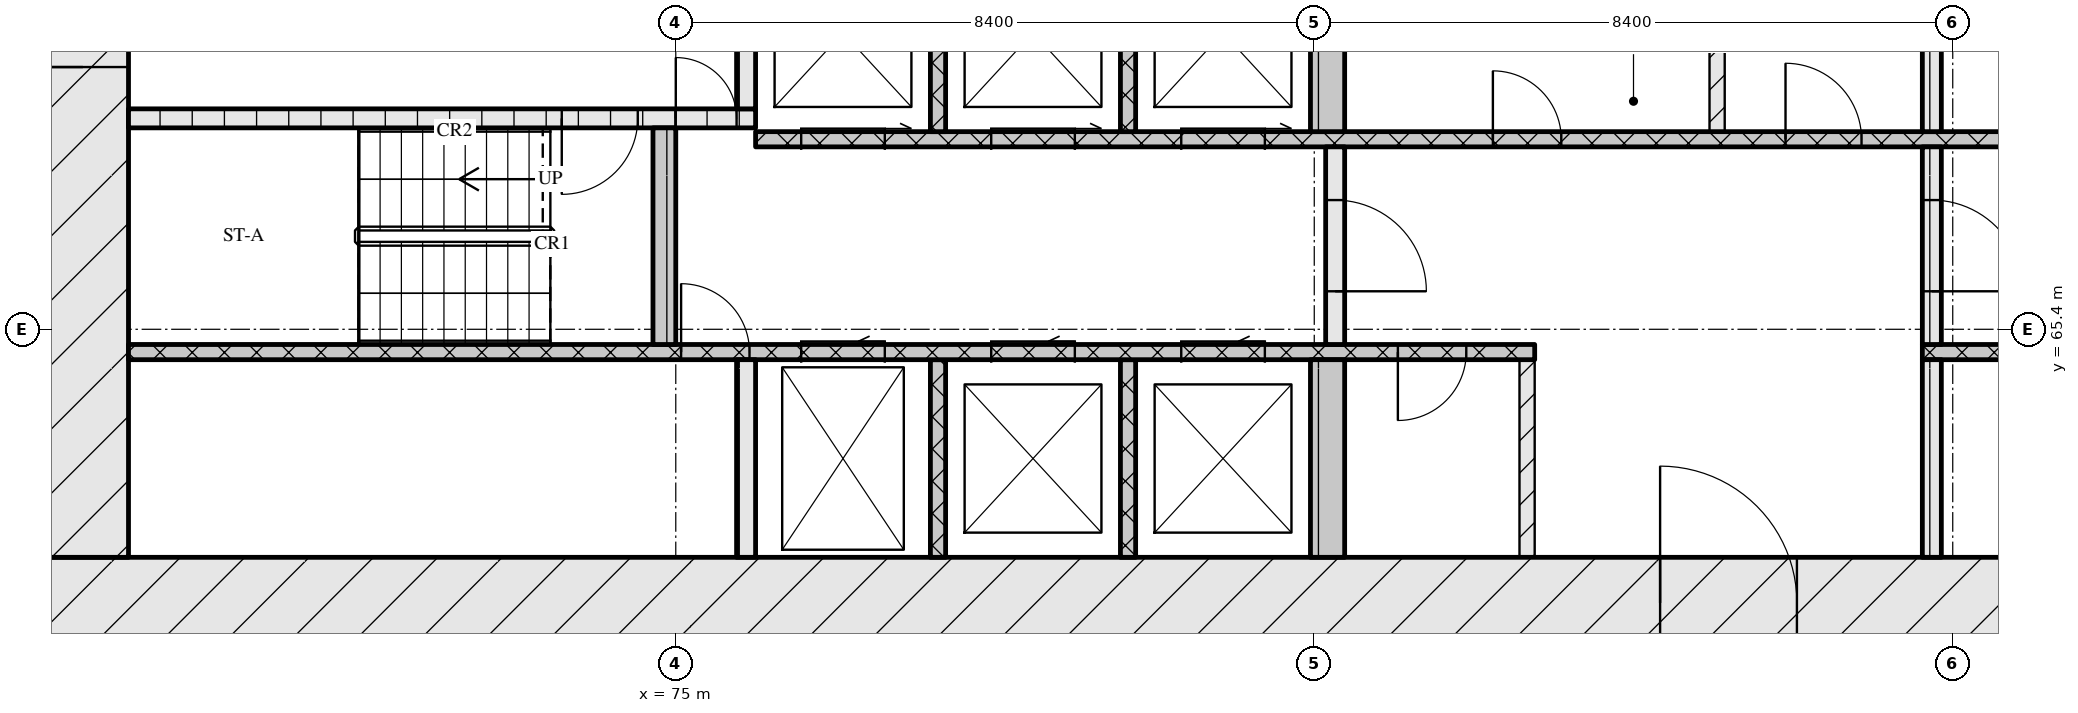
"""IFC4 building model, lengths in metres.
Left out: names, types, materials, properties, quantities, classifications, styles, units other than length and angle.
Written with IfcOpenShell. Run it as: python <this file> out.ifc"""

import sys

from ifc_helpers import new_model, si_unit, direction, frame, frame_2d, origin, place, context, subcontext, project, spatial, rectangle, extrude, element, fill, save


model = new_model("IFC4")
c1 = context("Model", 3, precision=1e-05, world=origin(), true_north=direction((0.0, 1.0)))
c2 = subcontext(c1, "Body", "Model", "MODEL_VIEW")
j1 = project(units=[si_unit("LENGTHUNIT", "METRE"), si_unit("PLANEANGLEUNIT", "RADIAN")], contexts=[c1])
p1 = place(None, origin())
s1 = spatial("IfcSite", under=j1, at=p1, CompositionType="ELEMENT")
p2 = place(p1, origin())
s2 = spatial("IfcBuilding", under=s1, at=p2, CompositionType="ELEMENT")
p3 = place(p2, frame((0.0, 0.0, 51.6)))
s3 = spatial("IfcBuildingStorey", under=s2, at=p3, CompositionType="ELEMENT", Elevation=51.6)
p4 = place(p3, frame((66.6, 61.8, 0.0), z_axis=(0.0, 0.0, 1.0), x_axis=(1.0, 0.0, 0.0)))
e1 = element("IfcWall", 1, at=p4, inside=s3, PredefinedType="SOLIDWALL", context=c2, shape_type="SweptSolid", body=[
    extrude(rectangle(XDim=42.0, YDim=1.2, at=frame_2d((21.0, 0.0))), origin(), (0.0, 0.0, 1.0), 3.32),
])
p5 = place(p4, frame((21.35, 0.0, 0.0)))
e2 = element("IfcOpeningElement", 2, at=p5, cuts=e1, PredefinedType="OPENING", context=c2, shape_type="SweptSolid", body=[
    extrude(rectangle(XDim=1.8, YDim=2.1, at=frame_2d((0.9, 1.05))), frame((0.0, 0.61, 0.0), z_axis=(0.0, -1.0, 0.0), x_axis=(1.0, 0.0, 0.0)), (0.0, 0.0, 1.0), 1.22),
])
p6 = place(p3, frame((67.2, 62.4, 0.0), z_axis=(0.0, 0.0, 1.0), x_axis=(0.0, 1.0, 0.0)))
e3 = element("IfcWall", 3, at=p6, inside=s3, PredefinedType="SOLIDWALL", context=c2, shape_type="SweptSolid", body=[
    extrude(rectangle(XDim=12.0, YDim=1.2, at=frame_2d((6.0, 0.0))), origin(), (0.0, 0.0, 1.0), 3.32),
])
p7 = place(p6, frame((6.45, 0.0, 0.0)))
e4 = element("IfcOpeningElement", 4, at=p7, cuts=e3, PredefinedType="OPENING", context=c2, shape_type="SweptSolid", body=[
    extrude(rectangle(XDim=1.2, YDim=2.1, at=frame_2d((0.6, 1.05))), frame((0.0, 0.61, 0.0), z_axis=(0.0, -1.0, 0.0), x_axis=(1.0, 0.0, 0.0)), (0.0, 0.0, 1.0), 1.22),
])
p8 = place(p3, frame((75.925, 62.4, 0.0), z_axis=(0.0, 0.0, 1.0), x_axis=(0.0, 1.0, 0.0)))
e5 = element("IfcWall", 5, at=p8, inside=s3, PredefinedType="SOLIDWALL", context=c2, shape_type="SweptSolid", body=[
    extrude(rectangle(XDim=2.6, YDim=0.25, at=frame_2d((1.3, 0.0))), origin(), (0.0, 0.0, 1.0), 3.32),
])
for number, where, z_axis, x_axis in (
    (6, (78.45, 62.4, 0.0), (0.0, 0.0, 1.0), (0.0, 1.0, 0.0)),
    (7, (80.95, 62.4, 0.0), (0.0, 0.0, 1.0), (0.0, 1.0, 0.0)),
):
    element("IfcWall", number, at=place(p3, frame(where, z_axis=z_axis, x_axis=x_axis)), inside=s3, PredefinedType="SOLIDWALL", context=c2, shape_type="SweptSolid", body=[
        extrude(rectangle(XDim=2.6, YDim=0.2, at=frame_2d((1.3, 0.0))), origin(), (0.0, 0.0, 1.0), 3.32),
    ])
p9 = place(p3, frame((83.575, 62.4, 0.0), z_axis=(0.0, 0.0, 1.0), x_axis=(0.0, 1.0, 0.0)))
e8 = element("IfcWall", 8, at=p9, inside=s3, PredefinedType="SOLIDWALL", context=c2, shape_type="SweptSolid", body=[
    extrude(rectangle(XDim=2.6, YDim=0.45, at=frame_2d((1.3, 0.0))), origin(), (0.0, 0.0, 1.0), 3.32),
])
p10 = place(p3, frame((86.2, 62.4, 0.0), z_axis=(0.0, 0.0, 1.0), x_axis=(0.0, 1.0, 0.0)))
e9 = element("IfcWall", 9, at=p10, inside=s3, PredefinedType="PARTITIONING", context=c2, shape_type="SweptSolid", body=[
    extrude(rectangle(XDim=2.6, YDim=0.2, at=frame_2d((1.3, 0.0))), origin(), (0.0, 0.0, 1.0), 3.32),
])
p11 = place(p3, frame((91.525, 62.4, 0.0), z_axis=(0.0, 0.0, 1.0), x_axis=(0.0, 1.0, 0.0)))
e10 = element("IfcWall", 10, at=p11, inside=s3, PredefinedType="SOLIDWALL", context=c2, shape_type="SweptSolid", body=[
    extrude(rectangle(XDim=2.6, YDim=0.25, at=frame_2d((1.3, 0.0))), origin(), (0.0, 0.0, 1.0), 3.32),
])
p12 = place(p3, frame((67.8, 65.1, 0.0), z_axis=(0.0, 0.0, 1.0), x_axis=(1.0, 0.0, 0.0)))
e11 = element("IfcWall", 11, at=p12, inside=s3, PredefinedType="SOLIDWALL", context=c2, shape_type="SweptSolid", body=[
    extrude(rectangle(XDim=18.5, YDim=0.2, at=frame_2d((9.25, 0.0))), origin(), (0.0, 0.0, 1.0), 3.32),
])
p13 = place(p12, frame((7.27, 0.0, 0.0)))
e12 = element("IfcOpeningElement", 12, at=p13, cuts=e11, PredefinedType="OPENING", context=c2, shape_type="SweptSolid", body=[
    extrude(rectangle(XDim=0.9, YDim=2.1, at=frame_2d((0.45, 1.05))), frame((0.0, 0.11, 0.0), z_axis=(0.0, -1.0, 0.0), x_axis=(1.0, 0.0, 0.0)), (0.0, 0.0, 1.0), 0.22),
])
p14 = place(p12, frame((8.85, 0.0, 0.0)))
e13 = element("IfcOpeningElement", 13, at=p14, cuts=e11, PredefinedType="OPENING", context=c2, shape_type="SweptSolid", body=[
    extrude(rectangle(XDim=1.1, YDim=2.1, at=frame_2d((0.55, 1.05))), frame((0.0, 0.11, 0.0), z_axis=(0.0, -1.0, 0.0), x_axis=(1.0, 0.0, 0.0)), (0.0, 0.0, 1.0), 0.22),
])
p15 = place(p12, frame((11.35, 0.0, 0.0)))
e14 = element("IfcOpeningElement", 14, at=p15, cuts=e11, PredefinedType="OPENING", context=c2, shape_type="SweptSolid", body=[
    extrude(rectangle(XDim=1.1, YDim=2.1, at=frame_2d((0.55, 1.05))), frame((0.0, 0.11, 0.0), z_axis=(0.0, -1.0, 0.0), x_axis=(1.0, 0.0, 0.0)), (0.0, 0.0, 1.0), 0.22),
])
p16 = place(p12, frame((13.85, 0.0, 0.0)))
e15 = element("IfcOpeningElement", 15, at=p16, cuts=e11, PredefinedType="OPENING", context=c2, shape_type="SweptSolid", body=[
    extrude(rectangle(XDim=1.1, YDim=2.1, at=frame_2d((0.55, 1.05))), frame((0.0, 0.11, 0.0), z_axis=(0.0, -1.0, 0.0), x_axis=(1.0, 0.0, 0.0)), (0.0, 0.0, 1.0), 0.22),
])
p17 = place(p12, frame((16.7, 0.0, 0.0)))
e16 = element("IfcOpeningElement", 16, at=p17, cuts=e11, PredefinedType="OPENING", context=c2, shape_type="SweptSolid", body=[
    extrude(rectangle(XDim=0.9, YDim=2.1, at=frame_2d((0.45, 1.05))), frame((0.0, 0.11, 0.0), z_axis=(0.0, -1.0, 0.0), x_axis=(1.0, 0.0, 0.0)), (0.0, 0.0, 1.0), 0.22),
])
p18 = place(p3, frame((91.4, 65.1, 0.0), z_axis=(0.0, 0.0, 1.0), x_axis=(1.0, 0.0, 0.0)))
e17 = element("IfcWall", 17, at=p18, inside=s3, PredefinedType="SOLIDWALL", context=c2, shape_type="SweptSolid", body=[
    extrude(rectangle(XDim=16.0, YDim=0.2, at=frame_2d((8.0, 0.0))), origin(), (0.0, 0.0, 1.0), 3.32),
])
p19 = place(p18, frame((7.83, 0.0, 0.0)))
e18 = element("IfcOpeningElement", 18, at=p19, cuts=e17, PredefinedType="OPENING", context=c2, shape_type="SweptSolid", body=[
    extrude(rectangle(XDim=0.9, YDim=2.1, at=frame_2d((0.45, 1.05))), frame((0.0, 0.11, 0.0), z_axis=(0.0, -1.0, 0.0), x_axis=(1.0, 0.0, 0.0)), (0.0, 0.0, 1.0), 0.22),
])
p20 = place(p3, frame((74.85, 65.2, 0.0), z_axis=(0.0, 0.0, 1.0), x_axis=(0.0, 1.0, 0.0)))
e19 = element("IfcWall", 19, at=p20, inside=s3, PredefinedType="SOLIDWALL", context=c2, shape_type="SweptSolid", body=[
    extrude(rectangle(XDim=2.85, YDim=0.3, at=frame_2d((1.425, 0.0))), origin(), (0.0, 0.0, 1.0), 3.32),
])
p21 = place(p3, frame((83.675, 65.2, 0.0), z_axis=(0.0, 0.0, 1.0), x_axis=(0.0, 1.0, 0.0)))
e20 = element("IfcWall", 20, at=p21, inside=s3, PredefinedType="SOLIDWALL", context=c2, shape_type="SweptSolid", body=[
    extrude(rectangle(XDim=2.6, YDim=0.25, at=frame_2d((1.3, 0.0))), origin(), (0.0, 0.0, 1.0), 3.32),
])
p22 = place(p21, frame((0.7, 0.0, 0.0)))
e21 = element("IfcOpeningElement", 21, at=p22, cuts=e20, PredefinedType="OPENING", context=c2, shape_type="SweptSolid", body=[
    extrude(rectangle(XDim=1.2, YDim=2.1, at=frame_2d((0.6, 1.05))), frame((0.0, 0.135, 0.0), z_axis=(0.0, -1.0, 0.0), x_axis=(1.0, 0.0, 0.0)), (0.0, 0.0, 1.0), 0.27),
])
p23 = place(p3, frame((91.525, 65.2, 0.0), z_axis=(0.0, 0.0, 1.0), x_axis=(0.0, 1.0, 0.0)))
e22 = element("IfcWall", 22, at=p23, inside=s3, PredefinedType="SOLIDWALL", context=c2, shape_type="SweptSolid", body=[
    extrude(rectangle(XDim=2.6, YDim=0.25, at=frame_2d((1.3, 0.0))), origin(), (0.0, 0.0, 1.0), 3.32),
])
p24 = place(p23, frame((0.7, 0.0, 0.0)))
e23 = element("IfcOpeningElement", 23, at=p24, cuts=e22, PredefinedType="OPENING", context=c2, shape_type="SweptSolid", body=[
    extrude(rectangle(XDim=1.2, YDim=2.1, at=frame_2d((0.6, 1.05))), frame((0.0, 0.135, 0.0), z_axis=(0.0, -1.0, 0.0), x_axis=(1.0, 0.0, 0.0)), (0.0, 0.0, 1.0), 0.27),
])
p25 = place(p3, frame((76.05, 67.9, 0.0), z_axis=(0.0, 0.0, 1.0), x_axis=(1.0, 0.0, 0.0)))
e24 = element("IfcWall", 24, at=p25, inside=s3, PredefinedType="SOLIDWALL", context=c2, shape_type="SweptSolid", body=[
    extrude(rectangle(XDim=23.1, YDim=0.2, at=frame_2d((11.55, 0.0))), origin(), (0.0, 0.0, 1.0), 3.32),
])
p26 = place(p25, frame((0.6, 0.0, 0.0)))
e25 = element("IfcOpeningElement", 25, at=p26, cuts=e24, PredefinedType="OPENING", context=c2, shape_type="SweptSolid", body=[
    extrude(rectangle(XDim=1.1, YDim=2.1, at=frame_2d((0.55, 1.05))), frame((0.0, 0.11, 0.0), z_axis=(0.0, -1.0, 0.0), x_axis=(1.0, 0.0, 0.0)), (0.0, 0.0, 1.0), 0.22),
])
p27 = place(p25, frame((3.1, 0.0, 0.0)))
e26 = element("IfcOpeningElement", 26, at=p27, cuts=e24, PredefinedType="OPENING", context=c2, shape_type="SweptSolid", body=[
    extrude(rectangle(XDim=1.1, YDim=2.1, at=frame_2d((0.55, 1.05))), frame((0.0, 0.11, 0.0), z_axis=(0.0, -1.0, 0.0), x_axis=(1.0, 0.0, 0.0)), (0.0, 0.0, 1.0), 0.22),
])
p28 = place(p25, frame((5.6, 0.0, 0.0)))
e27 = element("IfcOpeningElement", 27, at=p28, cuts=e24, PredefinedType="OPENING", context=c2, shape_type="SweptSolid", body=[
    extrude(rectangle(XDim=1.1, YDim=2.1, at=frame_2d((0.55, 1.05))), frame((0.0, 0.11, 0.0), z_axis=(0.0, -1.0, 0.0), x_axis=(1.0, 0.0, 0.0)), (0.0, 0.0, 1.0), 0.22),
])
p29 = place(p25, frame((9.7, 0.0, 0.0)))
e28 = element("IfcOpeningElement", 28, at=p29, cuts=e24, PredefinedType="OPENING", context=c2, shape_type="SweptSolid", body=[
    extrude(rectangle(XDim=0.9, YDim=2.1, at=frame_2d((0.45, 1.05))), frame((0.0, 0.11, 0.0), z_axis=(0.0, -1.0, 0.0), x_axis=(1.0, 0.0, 0.0)), (0.0, 0.0, 1.0), 0.22),
])
p30 = place(p25, frame((13.55, 0.0, 0.0)))
e29 = element("IfcOpeningElement", 29, at=p30, cuts=e24, PredefinedType="OPENING", context=c2, shape_type="SweptSolid", body=[
    extrude(rectangle(XDim=1.0, YDim=2.1, at=frame_2d((0.5, 1.05))), frame((0.0, 0.11, 0.0), z_axis=(0.0, -1.0, 0.0), x_axis=(1.0, 0.0, 0.0)), (0.0, 0.0, 1.0), 0.22),
])
for number, where, z_axis, x_axis in (
    (30, (78.45, 68.0, 0.0), (0.0, 0.0, 1.0), (0.0, 1.0, 0.0)),
    (31, (80.95, 68.0, 0.0), (0.0, 0.0, 1.0), (0.0, 1.0, 0.0)),
):
    element("IfcWall", number, at=place(p3, frame(where, z_axis=z_axis, x_axis=x_axis)), inside=s3, PredefinedType="SOLIDWALL", context=c2, shape_type="SweptSolid", body=[
        extrude(rectangle(XDim=2.6, YDim=0.2, at=frame_2d((1.3, 0.0))), origin(), (0.0, 0.0, 1.0), 3.32),
    ])
p31 = place(p3, frame((83.575, 68.0, 0.0), z_axis=(0.0, 0.0, 1.0), x_axis=(0.0, 1.0, 0.0)))
e32 = element("IfcWall", 32, at=p31, inside=s3, PredefinedType="SOLIDWALL", context=c2, shape_type="SweptSolid", body=[
    extrude(rectangle(XDim=2.6, YDim=0.45, at=frame_2d((1.3, 0.0))), origin(), (0.0, 0.0, 1.0), 3.32),
])
p32 = place(p3, frame((88.7, 68.0, 0.0), z_axis=(0.0, 0.0, 1.0), x_axis=(0.0, 1.0, 0.0)))
e33 = element("IfcWall", 33, at=p32, inside=s3, PredefinedType="PARTITIONING", context=c2, shape_type="SweptSolid", body=[
    extrude(rectangle(XDim=2.6, YDim=0.2, at=frame_2d((1.3, 0.0))), origin(), (0.0, 0.0, 1.0), 3.32),
])
p33 = place(p3, frame((91.525, 68.0, 0.0), z_axis=(0.0, 0.0, 1.0), x_axis=(0.0, 1.0, 0.0)))
e34 = element("IfcWall", 34, at=p33, inside=s3, PredefinedType="SOLIDWALL", context=c2, shape_type="SweptSolid", body=[
    extrude(rectangle(XDim=2.6, YDim=0.25, at=frame_2d((1.3, 0.0))), origin(), (0.0, 0.0, 1.0), 3.32),
])
p34 = place(p3, frame((67.8, 68.175, 0.0), z_axis=(0.0, 0.0, 1.0), x_axis=(1.0, 0.0, 0.0)))
e35 = element("IfcWall", 35, at=p34, inside=s3, PredefinedType="SOLIDWALL", context=c2, shape_type="SweptSolid", body=[
    extrude(rectangle(XDim=8.25, YDim=0.25, at=frame_2d((4.125, 0.0))), origin(), (0.0, 0.0, 1.0), 3.32),
])
p35 = place(p34, frame((5.7, 0.0, 0.0)))
e36 = element("IfcOpeningElement", 36, at=p35, cuts=e35, PredefinedType="OPENING", context=c2, shape_type="SweptSolid", body=[
    extrude(rectangle(XDim=1.0, YDim=2.1, at=frame_2d((0.5, 1.05))), frame((0.0, 0.135, 0.0), z_axis=(0.0, -1.0, 0.0), x_axis=(1.0, 0.0, 0.0)), (0.0, 0.0, 1.0), 0.27),
])
p36 = place(p34, frame((7.2, 0.0, 0.0)))
e37 = element("IfcOpeningElement", 37, at=p36, cuts=e35, PredefinedType="OPENING", context=c2, shape_type="SweptSolid", body=[
    extrude(rectangle(XDim=0.8, YDim=2.1, at=frame_2d((0.4, 1.05))), frame((0.0, 0.135, 0.0), z_axis=(0.0, -1.0, 0.0), x_axis=(1.0, 0.0, 0.0)), (0.0, 0.0, 1.0), 0.27),
])
p37 = place(p3, frame((75.925, 68.3, 0.0), z_axis=(0.0, 0.0, 1.0), x_axis=(0.0, 1.0, 0.0)))
e38 = element("IfcWall", 38, at=p37, inside=s3, PredefinedType="SOLIDWALL", context=c2, shape_type="SweptSolid", body=[
    extrude(rectangle(XDim=2.3, YDim=0.25, at=frame_2d((1.15, 0.0))), origin(), (0.0, 0.0, 1.0), 3.32),
])
p38 = place(p5, origin())
e39 = element("IfcDoor", 39, at=p38, inside=s3, OperationType="DOUBLE_DOOR_SINGLE_SWING", PredefinedType="DOOR", context=c2, shape_type="SweptSolid", body=[
    extrude(rectangle(XDim=1.8, YDim=2.1, at=frame_2d((0.9, 1.05))), frame((0.0, 0.025, 0.0), z_axis=(0.0, -1.0, 0.0), x_axis=(1.0, 0.0, 0.0)), (0.0, 0.0, 1.0), 0.05),
])
fill(e2, e39)
p39 = place(p13, origin())
e40 = element("IfcDoor", 40, at=p39, inside=s3, OperationType="SINGLE_SWING_LEFT", PredefinedType="DOOR", context=c2, shape_type="SweptSolid", body=[
    extrude(rectangle(XDim=0.9, YDim=2.1, at=frame_2d((0.45, 1.05))), frame((0.0, 0.025, 0.0), z_axis=(0.0, -1.0, 0.0), x_axis=(1.0, 0.0, 0.0)), (0.0, 0.0, 1.0), 0.05),
])
fill(e12, e40)
p40 = place(p14, origin())
e41 = element("IfcDoor", 41, at=p40, inside=s3, OperationType="SLIDING_TO_LEFT", PredefinedType="DOOR", context=c2, shape_type="SweptSolid", body=[
    extrude(rectangle(XDim=1.1, YDim=2.1, at=frame_2d((0.55, 1.05))), frame((0.0, 0.025, 0.0), z_axis=(0.0, -1.0, 0.0), x_axis=(1.0, 0.0, 0.0)), (0.0, 0.0, 1.0), 0.05),
])
fill(e13, e41)
p41 = place(p15, origin())
e42 = element("IfcDoor", 42, at=p41, inside=s3, OperationType="SLIDING_TO_LEFT", PredefinedType="DOOR", context=c2, shape_type="SweptSolid", body=[
    extrude(rectangle(XDim=1.1, YDim=2.1, at=frame_2d((0.55, 1.05))), frame((0.0, 0.025, 0.0), z_axis=(0.0, -1.0, 0.0), x_axis=(1.0, 0.0, 0.0)), (0.0, 0.0, 1.0), 0.05),
])
fill(e14, e42)
p42 = place(p16, origin())
e43 = element("IfcDoor", 43, at=p42, inside=s3, OperationType="SLIDING_TO_LEFT", PredefinedType="DOOR", context=c2, shape_type="SweptSolid", body=[
    extrude(rectangle(XDim=1.1, YDim=2.1, at=frame_2d((0.55, 1.05))), frame((0.0, 0.025, 0.0), z_axis=(0.0, -1.0, 0.0), x_axis=(1.0, 0.0, 0.0)), (0.0, 0.0, 1.0), 0.05),
])
fill(e15, e43)
p43 = place(p17, origin())
e44 = element("IfcDoor", 44, at=p43, inside=s3, OperationType="SINGLE_SWING_RIGHT", PredefinedType="DOOR", context=c2, shape_type="SweptSolid", body=[
    extrude(rectangle(XDim=0.9, YDim=2.1, at=frame_2d((0.45, 1.05))), frame((0.0, 0.025, 0.0), z_axis=(0.0, -1.0, 0.0), x_axis=(1.0, 0.0, 0.0)), (0.0, 0.0, 1.0), 0.05),
])
fill(e16, e44)
p44 = place(p22, origin())
e45 = element("IfcDoor", 45, at=p44, inside=s3, OperationType="SINGLE_SWING_RIGHT", PredefinedType="DOOR", context=c2, shape_type="SweptSolid", body=[
    extrude(rectangle(XDim=1.2, YDim=2.1, at=frame_2d((0.6, 1.05))), frame((0.0, 0.025, 0.0), z_axis=(0.0, -1.0, 0.0), x_axis=(1.0, 0.0, 0.0)), (0.0, 0.0, 1.0), 0.05),
])
fill(e21, e45)
p45 = place(p24, origin())
e46 = element("IfcDoor", 46, at=p45, inside=s3, OperationType="SINGLE_SWING_RIGHT", PredefinedType="DOOR", context=c2, shape_type="SweptSolid", body=[
    extrude(rectangle(XDim=1.2, YDim=2.1, at=frame_2d((0.6, 1.05))), frame((0.0, 0.025, 0.0), z_axis=(0.0, -1.0, 0.0), x_axis=(1.0, 0.0, 0.0)), (0.0, 0.0, 1.0), 0.05),
])
fill(e23, e46)
p46 = place(p26, origin())
e47 = element("IfcDoor", 47, at=p46, inside=s3, OperationType="SLIDING_TO_RIGHT", PredefinedType="DOOR", context=c2, shape_type="SweptSolid", body=[
    extrude(rectangle(XDim=1.1, YDim=2.1, at=frame_2d((0.55, 1.05))), frame((0.0, 0.025, 0.0), z_axis=(0.0, -1.0, 0.0), x_axis=(1.0, 0.0, 0.0)), (0.0, 0.0, 1.0), 0.05),
])
fill(e25, e47)
p47 = place(p27, origin())
e48 = element("IfcDoor", 48, at=p47, inside=s3, OperationType="SLIDING_TO_RIGHT", PredefinedType="DOOR", context=c2, shape_type="SweptSolid", body=[
    extrude(rectangle(XDim=1.1, YDim=2.1, at=frame_2d((0.55, 1.05))), frame((0.0, 0.025, 0.0), z_axis=(0.0, -1.0, 0.0), x_axis=(1.0, 0.0, 0.0)), (0.0, 0.0, 1.0), 0.05),
])
fill(e26, e48)
p48 = place(p28, origin())
e49 = element("IfcDoor", 49, at=p48, inside=s3, OperationType="SLIDING_TO_RIGHT", PredefinedType="DOOR", context=c2, shape_type="SweptSolid", body=[
    extrude(rectangle(XDim=1.1, YDim=2.1, at=frame_2d((0.55, 1.05))), frame((0.0, 0.025, 0.0), z_axis=(0.0, -1.0, 0.0), x_axis=(1.0, 0.0, 0.0)), (0.0, 0.0, 1.0), 0.05),
])
fill(e27, e49)
p49 = place(p29, origin())
e50 = element("IfcDoor", 50, at=p49, inside=s3, OperationType="SINGLE_SWING_LEFT", PredefinedType="DOOR", context=c2, shape_type="SweptSolid", body=[
    extrude(rectangle(XDim=0.9, YDim=2.1, at=frame_2d((0.45, 1.05))), frame((0.0, 0.025, 0.0), z_axis=(0.0, -1.0, 0.0), x_axis=(1.0, 0.0, 0.0)), (0.0, 0.0, 1.0), 0.05),
])
fill(e28, e50)
p50 = place(p30, origin())
e51 = element("IfcDoor", 51, at=p50, inside=s3, OperationType="SINGLE_SWING_LEFT", PredefinedType="DOOR", context=c2, shape_type="SweptSolid", body=[
    extrude(rectangle(XDim=1.0, YDim=2.1, at=frame_2d((0.5, 1.05))), frame((0.0, 0.025, 0.0), z_axis=(0.0, -1.0, 0.0), x_axis=(1.0, 0.0, 0.0)), (0.0, 0.0, 1.0), 0.05),
])
fill(e29, e51)
p51 = place(p35, origin())
e52 = element("IfcDoor", 52, at=p51, inside=s3, OperationType="SINGLE_SWING_RIGHT", PredefinedType="DOOR", context=c2, shape_type="SweptSolid", body=[
    extrude(rectangle(XDim=1.0, YDim=2.1, at=frame_2d((0.5, 1.05))), frame((0.0, 0.025, 0.0), z_axis=(0.0, -1.0, 0.0), x_axis=(1.0, 0.0, 0.0)), (0.0, 0.0, 1.0), 0.05),
])
fill(e36, e52)
p52 = place(p36, origin())
e53 = element("IfcDoor", 53, at=p52, inside=s3, OperationType="SINGLE_SWING_LEFT", PredefinedType="DOOR", context=c2, shape_type="SweptSolid", body=[
    extrude(rectangle(XDim=0.8, YDim=2.1, at=frame_2d((0.4, 1.05))), frame((0.0, 0.025, 0.0), z_axis=(0.0, -1.0, 0.0), x_axis=(1.0, 0.0, 0.0)), (0.0, 0.0, 1.0), 0.05),
])
fill(e37, e53)
p53 = place(p7, origin())
e54 = element("IfcDoor", 54, at=p53, inside=s3, OperationType="SINGLE_SWING_LEFT", PredefinedType="DOOR", context=c2, shape_type="SweptSolid", body=[
    extrude(rectangle(XDim=1.2, YDim=2.1, at=frame_2d((0.6, 1.05))), frame((0.0, 0.025, 0.0), z_axis=(0.0, -1.0, 0.0), x_axis=(1.0, 0.0, 0.0)), (0.0, 0.0, 1.0), 0.05),
])
fill(e4, e54)
save(model, sys.argv[1])
